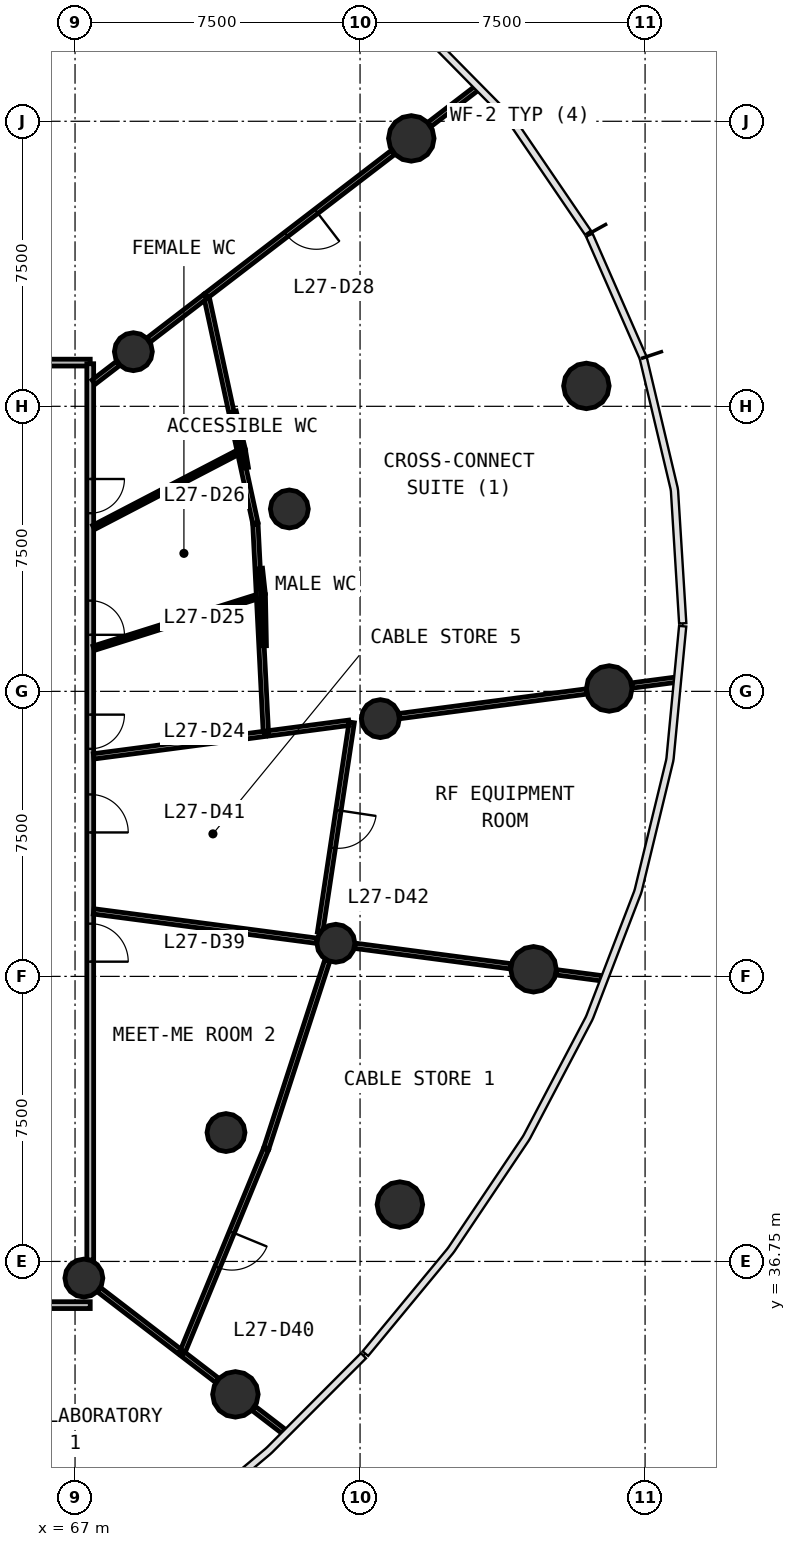
"""IFC4 building model, lengths in metres.
Left out: names, types, materials, properties, quantities, classifications, styles, units other than length and angle.
Written with IfcOpenShell. Run it as: python <this file> out.ifc"""

import sys

from ifc_helpers import new_model, si_unit, direction, frame, frame_2d, origin, origin_2d, place, context, subcontext, project, spatial, rectangle, circle, extrude, source, transform, mapped, element, fill, save


model = new_model("IFC4")
c1 = context("Model", 3, precision=1e-05, world=origin(), true_north=direction((0.0, 1.0)))
c2 = subcontext(c1, "Body", "Model", "MODEL_VIEW")
j1 = project(units=[si_unit("LENGTHUNIT", "METRE"), si_unit("PLANEANGLEUNIT", "RADIAN")], contexts=[c1])
p1 = place(None, origin())
s1 = spatial("IfcSite", under=j1, at=p1, CompositionType="ELEMENT")
p2 = place(p1, origin())
s2 = spatial("IfcBuilding", under=s1, at=p2, CompositionType="ELEMENT")
p3 = place(p2, frame((0.0, 0.0, 116.7)))
s3 = spatial("IfcBuildingStorey", under=s2, at=p3, CompositionType="ELEMENT", Elevation=116.7)
m1 = source(origin(), c2, "Body", "SweptSolid", [
    extrude(circle(Radius=0.6, at=origin_2d()), origin(), (0.0, 0.0, 1.0), 4.1),
])
for number, where, z_axis, x_axis in (
    (1, (81.056, 51.825, 0.0), (0.0, 0.0, 1.0), (1.0, 0.0, 0.0)),
    (2, (80.456, 59.787, 0.0), (0.0, 0.0, 1.0), (1.0, 0.0, 0.0)),
    (3, (75.848, 66.299, 0.0), (0.0, 0.0, 1.0), (1.0, 0.0, 0.0)),
    (4, (71.22, 33.252, 0.0), (0.0, 0.0, 1.0), (1.0, 0.0, 0.0)),
    (5, (75.548, 38.246, 0.0), (0.0, 0.0, 1.0), (1.0, 0.0, 0.0)),
    (6, (79.064, 44.437, 0.0), (0.0, 0.0, 1.0), (1.0, 0.0, 0.0)),
):
    element("IfcColumn", number, at=place(p3, frame(where, z_axis=z_axis, x_axis=x_axis)), inside=s3, PredefinedType="COLUMN", context=c2, shape_type="MappedRepresentation", body=[
        mapped(m1, transform((0.0, 0.0, 0.0), scale=1.0)),
    ])
m2 = source(origin(), c2, "Body", "SweptSolid", [
    extrude(circle(Radius=0.5, at=origin_2d()), origin(), (0.0, 0.0, 1.0), 4.1),
])
for number, where, z_axis, x_axis in (
    (7, (75.034, 51.032, 0.0), (0.0, 0.0, 1.0), (1.0, 0.0, 0.0)),
    (8, (72.639, 56.549, 0.0), (0.0, 0.0, 1.0), (1.0, 0.0, 0.0)),
    (9, (68.535, 60.688, 0.0), (0.0, 0.0, 1.0), (1.0, 0.0, 0.0)),
    (10, (67.232, 36.312, 0.0), (0.0, 0.0, 1.0), (1.0, 0.0, 0.0)),
    (11, (70.972, 40.141, 0.0), (0.0, 0.0, 1.0), (1.0, 0.0, 0.0)),
    (12, (73.863, 45.122, 0.0), (0.0, 0.0, 1.0), (1.0, 0.0, 0.0)),
):
    element("IfcColumn", number, at=place(p3, frame(where, z_axis=z_axis, x_axis=x_axis)), inside=s3, PredefinedType="COLUMN", context=c2, shape_type="MappedRepresentation", body=[
        mapped(m2, transform((0.0, 0.0, 0.0), scale=1.0)),
    ])
p4 = place(p3, frame((67.4, 35.6, 0.0), z_axis=(0.0, 0.0, 1.0), x_axis=(-1.0, 0.0, 0.0)))
e13 = element("IfcWall", 13, at=p4, inside=s3, PredefinedType="PARTITIONING", context=c2, shape_type="SweptSolid", body=[
    extrude(rectangle(XDim=30.8, YDim=0.18, at=frame_2d((15.4, 0.0))), origin(), (0.0, 0.0, 1.0), 2.9),
])
p5 = place(p4, frame((17.35, 0.0, 0.0)))
e14 = element("IfcOpeningElement", 14, at=p5, cuts=e13, PredefinedType="OPENING", context=c2, shape_type="SweptSolid", body=[
    extrude(rectangle(XDim=1.0, YDim=2.1, at=frame_2d((0.5, 1.05))), frame((0.0, 0.1, 0.0), z_axis=(0.0, -1.0, 0.0), x_axis=(1.0, 0.0, 0.0)), (0.0, 0.0, 1.0), 0.2),
])
p6 = place(p4, frame((14.95, 0.0, 0.0)))
e15 = element("IfcOpeningElement", 15, at=p6, cuts=e13, PredefinedType="OPENING", context=c2, shape_type="SweptSolid", body=[
    extrude(rectangle(XDim=1.0, YDim=2.1, at=frame_2d((0.5, 1.05))), frame((0.0, 0.1, 0.0), z_axis=(0.0, -1.0, 0.0), x_axis=(1.0, 0.0, 0.0)), (0.0, 0.0, 1.0), 0.2),
])
p7 = place(p4, frame((4.35, 0.0, 0.0)))
e16 = element("IfcOpeningElement", 16, at=p7, cuts=e13, PredefinedType="OPENING", context=c2, shape_type="SweptSolid", body=[
    extrude(rectangle(XDim=1.0, YDim=2.1, at=frame_2d((0.5, 1.05))), frame((0.0, 0.1, 0.0), z_axis=(0.0, -1.0, 0.0), x_axis=(1.0, 0.0, 0.0)), (0.0, 0.0, 1.0), 0.2),
])
p8 = place(p3, frame((36.6, 60.4, 0.0), z_axis=(0.0, 0.0, 1.0), x_axis=(1.0, 0.0, 0.0)))
e17 = element("IfcWall", 17, at=p8, inside=s3, PredefinedType="PARTITIONING", context=c2, shape_type="SweptSolid", body=[
    extrude(rectangle(XDim=30.8, YDim=0.18, at=frame_2d((15.4, 0.0))), origin(), (0.0, 0.0, 1.0), 2.9),
])
p9 = place(p8, frame((17.35, 0.0, 0.0)))
e18 = element("IfcOpeningElement", 18, at=p9, cuts=e17, PredefinedType="OPENING", context=c2, shape_type="SweptSolid", body=[
    extrude(rectangle(XDim=1.0, YDim=2.1, at=frame_2d((0.5, 1.05))), frame((0.0, 0.1, 0.0), z_axis=(0.0, -1.0, 0.0), x_axis=(1.0, 0.0, 0.0)), (0.0, 0.0, 1.0), 0.2),
])
p10 = place(p8, frame((14.95, 0.0, 0.0)))
e19 = element("IfcOpeningElement", 19, at=p10, cuts=e17, PredefinedType="OPENING", context=c2, shape_type="SweptSolid", body=[
    extrude(rectangle(XDim=1.0, YDim=2.1, at=frame_2d((0.5, 1.05))), frame((0.0, 0.1, 0.0), z_axis=(0.0, -1.0, 0.0), x_axis=(1.0, 0.0, 0.0)), (0.0, 0.0, 1.0), 0.2),
])
p11 = place(p8, frame((8.95, 0.0, 0.0)))
e20 = element("IfcOpeningElement", 20, at=p11, cuts=e17, PredefinedType="OPENING", context=c2, shape_type="SweptSolid", body=[
    extrude(rectangle(XDim=1.0, YDim=2.1, at=frame_2d((0.5, 1.05))), frame((0.0, 0.1, 0.0), z_axis=(0.0, -1.0, 0.0), x_axis=(1.0, 0.0, 0.0)), (0.0, 0.0, 1.0), 0.2),
])
p12 = place(p3, frame((67.4, 60.37, 0.0), z_axis=(0.0, 0.0, 1.0), x_axis=(0.0, -1.0, 0.0)))
e21 = element("IfcWall", 21, at=p12, inside=s3, PredefinedType="PARTITIONING", context=c2, shape_type="SweptSolid", body=[
    extrude(rectangle(XDim=23.583, YDim=0.18, at=frame_2d((11.791, 0.0))), origin(), (0.0, 0.0, 1.0), 2.9),
])
p13 = place(p12, frame((9.232, 0.0, 0.0)))
e22 = element("IfcOpeningElement", 22, at=p13, cuts=e21, PredefinedType="OPENING", context=c2, shape_type="SweptSolid", body=[
    extrude(rectangle(XDim=0.9, YDim=2.1, at=frame_2d((0.45, 1.05))), frame((0.0, 0.1, 0.0), z_axis=(0.0, -1.0, 0.0), x_axis=(1.0, 0.0, 0.0)), (0.0, 0.0, 1.0), 0.2),
])
p14 = place(p12, frame((6.232, 0.0, 0.0)))
e23 = element("IfcOpeningElement", 23, at=p14, cuts=e21, PredefinedType="OPENING", context=c2, shape_type="SweptSolid", body=[
    extrude(rectangle(XDim=0.9, YDim=2.1, at=frame_2d((0.45, 1.05))), frame((0.0, 0.1, 0.0), z_axis=(0.0, -1.0, 0.0), x_axis=(1.0, 0.0, 0.0)), (0.0, 0.0, 1.0), 0.2),
])
p15 = place(p12, frame((3.032, 0.0, 0.0)))
e24 = element("IfcOpeningElement", 24, at=p15, cuts=e21, PredefinedType="OPENING", context=c2, shape_type="SweptSolid", body=[
    extrude(rectangle(XDim=0.9, YDim=2.1, at=frame_2d((0.45, 1.05))), frame((0.0, 0.1, 0.0), z_axis=(0.0, -1.0, 0.0), x_axis=(1.0, 0.0, 0.0)), (0.0, 0.0, 1.0), 0.2),
])
p16 = place(p12, frame((14.732, 0.0, 0.0)))
e25 = element("IfcOpeningElement", 25, at=p16, cuts=e21, PredefinedType="OPENING", context=c2, shape_type="SweptSolid", body=[
    extrude(rectangle(XDim=1.0, YDim=2.1, at=frame_2d((0.5, 1.05))), frame((0.0, 0.1, 0.0), z_axis=(0.0, -1.0, 0.0), x_axis=(1.0, 0.0, 0.0)), (0.0, 0.0, 1.0), 0.2),
])
p17 = place(p12, frame((11.333, 0.0, 0.0)))
e26 = element("IfcOpeningElement", 26, at=p17, cuts=e21, PredefinedType="OPENING", context=c2, shape_type="SweptSolid", body=[
    extrude(rectangle(XDim=1.0, YDim=2.1, at=frame_2d((0.5, 1.05))), frame((0.0, 0.1, 0.0), z_axis=(0.0, -1.0, 0.0), x_axis=(1.0, 0.0, 0.0)), (0.0, 0.0, 1.0), 0.2),
])
p18 = place(p3, frame((75.369, 65.931, 0.0), z_axis=(0.0, 0.0, 1.0), x_axis=(-0.793364649737, -0.608746689969, 0.0)))
e27 = element("IfcWall", 27, at=p18, inside=s3, PredefinedType="PARTITIONING", context=c2, shape_type="SweptSolid", body=[
    extrude(rectangle(XDim=6.196, YDim=0.14, at=frame_2d((3.098, 0.0))), origin(), (0.0, 0.0, 1.0), 2.9),
])
p19 = place(p18, frame((2.545, 0.0, 0.0)))
e28 = element("IfcOpeningElement", 28, at=p19, cuts=e27, PredefinedType="OPENING", context=c2, shape_type="SweptSolid", body=[
    extrude(rectangle(XDim=1.0, YDim=2.1, at=frame_2d((0.5, 1.05))), frame((0.0, 0.08, 0.0), z_axis=(0.0, -1.0, 0.0), x_axis=(1.0, 0.0, 0.0)), (0.0, 0.0, 1.0), 0.16),
])
p20 = place(p3, frame((71.745, 56.178, 0.0), z_axis=(0.0, 0.0, 1.0), x_axis=(-0.211012899324, 0.977483276746, 0.0)))
e29 = element("IfcWall", 29, at=p20, inside=s3, PredefinedType="PARTITIONING", context=c2, shape_type="SweptSolid", body=[
    extrude(rectangle(XDim=6.089, YDim=0.14, at=frame_2d((3.045, 0.0))), origin(), (0.0, 0.0, 1.0), 2.9),
])
p21 = place(p3, frame((67.49, 45.961, 0.0), z_axis=(0.0, 0.0, 1.0), x_axis=(0.991445034615, -0.130524876315, 0.0)))
e30 = element("IfcWall", 30, at=p21, inside=s3, PredefinedType="PARTITIONING", context=c2, shape_type="SweptSolid", body=[
    extrude(rectangle(XDim=5.924, YDim=0.14, at=frame_2d((2.962, 0.0))), origin(), (0.0, 0.0, 1.0), 2.9),
])
p22 = place(p3, frame((72.025, 39.705, 0.0), z_axis=(0.0, 0.0, 1.0), x_axis=(-0.380730787006, -0.924685929289, 0.0)))
e31 = element("IfcWall", 31, at=p22, inside=s3, PredefinedType="PARTITIONING", context=c2, shape_type="SweptSolid", body=[
    extrude(rectangle(XDim=5.811, YDim=0.14, at=frame_2d((2.906, 0.0))), origin(), (0.0, 0.0, 1.0), 2.9),
])
p23 = place(p22, frame((2.361, 0.0, 0.0)))
e32 = element("IfcOpeningElement", 32, at=p23, cuts=e31, PredefinedType="OPENING", context=c2, shape_type="SweptSolid", body=[
    extrude(rectangle(XDim=1.0, YDim=2.1, at=frame_2d((0.5, 1.05))), frame((0.0, 0.08, 0.0), z_axis=(0.0, -1.0, 0.0), x_axis=(1.0, 0.0, 0.0)), (0.0, 0.0, 1.0), 0.16),
])
p24 = place(p3, frame((74.281, 50.933, 0.0), z_axis=(0.0, 0.0, 1.0), x_axis=(-0.149214013395, -0.988804924243, 0.0)))
e33 = element("IfcWall", 33, at=p24, inside=s3, PredefinedType="PARTITIONING", context=c2, shape_type="SweptSolid", body=[
    extrude(rectangle(XDim=5.589, YDim=0.14, at=frame_2d((2.794, 0.0))), origin(), (0.0, 0.0, 1.0), 2.9),
])
p25 = place(p24, frame((2.339, 0.0, 0.0)))
e34 = element("IfcOpeningElement", 34, at=p25, cuts=e33, PredefinedType="OPENING", context=c2, shape_type="SweptSolid", body=[
    extrude(rectangle(XDim=1.0, YDim=2.1, at=frame_2d((0.5, 1.05))), frame((0.0, 0.08, 0.0), z_axis=(0.0, -1.0, 0.0), x_axis=(1.0, 0.0, 0.0)), (0.0, 0.0, 1.0), 0.16),
])
p26 = place(p3, frame((72.023, 50.636, 0.0), z_axis=(0.0, 0.0, 1.0), x_axis=(-0.050114100286, 0.998743499079, 0.0)))
e35 = element("IfcWall", 35, at=p26, inside=s3, PredefinedType="PARTITIONING", context=c2, shape_type="SweptSolid", body=[
    extrude(rectangle(XDim=5.52, YDim=0.14, at=frame_2d((2.76, 0.0))), origin(), (0.0, 0.0, 1.0), 2.9),
])
p27 = place(p3, frame((72.035, 39.734, 0.0), z_axis=(0.0, 0.0, 1.0), x_axis=(0.309177540115, 0.95100433684, 0.0)))
e36 = element("IfcWall", 36, at=p27, inside=s3, PredefinedType="PARTITIONING", context=c2, shape_type="SweptSolid", body=[
    extrude(rectangle(XDim=5.19, YDim=0.14, at=frame_2d((2.595, 0.0))), origin(), (0.0, 0.0, 1.0), 2.9),
])
p28 = place(p3, frame((75.534, 51.098, 0.0), z_axis=(0.0, 0.0, 1.0), x_axis=(0.991443414541, 0.130537181533, 0.0)))
e37 = element("IfcWall", 37, at=p28, inside=s3, PredefinedType="PARTITIONING", context=c2, shape_type="SweptSolid", body=[
    extrude(rectangle(XDim=4.966, YDim=0.14, at=frame_2d((2.483, 0.0))), origin(), (0.0, 0.0, 1.0), 2.9),
])
p29 = place(p3, frame((67.49, 50.039, 0.0), z_axis=(0.0, 0.0, 1.0), x_axis=(0.991447158899, 0.130508739594, 0.0)))
e38 = element("IfcWall", 38, at=p29, inside=s3, PredefinedType="PARTITIONING", context=c2, shape_type="SweptSolid", body=[
    extrude(rectangle(XDim=4.542, YDim=0.14, at=frame_2d((2.271, 0.0))), origin(), (0.0, 0.0, 1.0), 2.9),
])
p30 = place(p3, frame((74.363, 45.056, 0.0), z_axis=(0.0, 0.0, 1.0), x_axis=(0.991445054296, -0.130524726824, 0.0)))
e39 = element("IfcWall", 39, at=p30, inside=s3, PredefinedType="PARTITIONING", context=c2, shape_type="SweptSolid", body=[
    extrude(rectangle(XDim=4.137, YDim=0.14, at=frame_2d((2.069, 0.0))), origin(), (0.0, 0.0, 1.0), 2.9),
])
p31 = place(p3, frame((67.633, 36.005, 0.0), z_axis=(0.0, 0.0, 1.0), x_axis=(0.793349293227, -0.60876670321, 0.0)))
e40 = element("IfcWall", 40, at=p31, inside=s3, PredefinedType="PARTITIONING", context=c2, shape_type="SweptSolid", body=[
    extrude(rectangle(XDim=2.676, YDim=0.14, at=frame_2d((1.338, 0.0))), origin(), (0.0, 0.0, 1.0), 2.9),
])
p32 = place(p3, frame((72.092, 50.645, 0.0), z_axis=(0.0, 0.0, 1.0), x_axis=(0.991447286478, 0.130507770405, 0.0)))
e41 = element("IfcWall", 41, at=p32, inside=s3, PredefinedType="PARTITIONING", context=c2, shape_type="SweptSolid", body=[
    extrude(rectangle(XDim=2.135, YDim=0.14, at=frame_2d((1.067, 0.0))), origin(), (0.0, 0.0, 1.0), 2.9),
])
p33 = place(p3, frame((68.935, 60.995, 0.0), z_axis=(0.0, 0.0, 1.0), x_axis=(0.793326792115, 0.608796025703, 0.0)))
e42 = element("IfcWall", 42, at=p33, inside=s3, PredefinedType="PARTITIONING", context=c2, shape_type="SweptSolid", body=[
    extrude(rectangle(XDim=1.884, YDim=0.14, at=frame_2d((0.942, 0.0))), origin(), (0.0, 0.0, 1.0), 2.9),
])
p34 = place(p3, frame((76.328, 66.667, 0.0), z_axis=(0.0, 0.0, 1.0), x_axis=(0.793354548889, 0.60875985393, 0.0)))
e43 = element("IfcWall", 43, at=p34, inside=s3, PredefinedType="PARTITIONING", context=c2, shape_type="SweptSolid", body=[
    extrude(rectangle(XDim=1.576, YDim=0.14, at=frame_2d((0.788, 0.0))), origin(), (0.0, 0.0, 1.0), 2.9),
])
p35 = place(p3, frame((79.664, 44.358, 0.0), z_axis=(0.0, 0.0, 1.0), x_axis=(0.991444694364, -0.130527460778, 0.0)))
e44 = element("IfcWall", 44, at=p35, inside=s3, PredefinedType="PARTITIONING", context=c2, shape_type="SweptSolid", body=[
    extrude(rectangle(XDim=1.212, YDim=0.14, at=frame_2d((0.606, 0.0))), origin(), (0.0, 0.0, 1.0), 2.9),
])
p36 = place(p3, frame((69.837, 34.313, 0.0), z_axis=(0.0, 0.0, 1.0), x_axis=(0.79334062517, -0.60877799932, 0.0)))
e45 = element("IfcWall", 45, at=p36, inside=s3, PredefinedType="PARTITIONING", context=c2, shape_type="SweptSolid", body=[
    extrude(rectangle(XDim=1.139, YDim=0.14, at=frame_2d((0.569, 0.0))), origin(), (0.0, 0.0, 1.0), 2.9),
])
p37 = place(p3, frame((81.656, 51.904, 0.0), z_axis=(0.0, 0.0, 1.0), x_axis=(0.991450010741, 0.130487072933, 0.0)))
e46 = element("IfcWall", 46, at=p37, inside=s3, PredefinedType="PARTITIONING", context=c2, shape_type="SweptSolid", body=[
    extrude(rectangle(XDim=1.164, YDim=0.14, at=frame_2d((0.582, 0.0))), origin(), (0.0, 0.0, 1.0), 2.9),
])
p38 = place(p3, frame((71.699, 32.884, 0.0), z_axis=(0.0, 0.0, 1.0), x_axis=(0.793356384424, -0.608757461798, 0.0)))
e47 = element("IfcWall", 47, at=p38, inside=s3, PredefinedType="PARTITIONING", context=c2, shape_type="SweptSolid", body=[
    extrude(rectangle(XDim=0.99, YDim=0.14, at=frame_2d((0.495, 0.0))), origin(), (0.0, 0.0, 1.0), 2.9),
])
p39 = place(p3, frame((67.49, 59.886, 0.0), z_axis=(0.0, 0.0, 1.0), x_axis=(0.793316076519, 0.608809989025, 0.0)))
e48 = element("IfcWall", 48, at=p39, inside=s3, PredefinedType="PARTITIONING", context=c2, shape_type="SweptSolid", body=[
    extrude(rectangle(XDim=0.812, YDim=0.14, at=frame_2d((0.406, 0.0))), origin(), (0.0, 0.0, 1.0), 2.9),
])
p40 = place(p3, frame((67.49, 52.884, 0.0), z_axis=(0.0, 0.0, 1.0), x_axis=(0.953722264315, 0.300688946503, 0.0)))
e49 = element("IfcWall", 49, at=p40, inside=s3, PredefinedType="PARTITIONING", context=c2, shape_type="SweptSolid", body=[
    extrude(rectangle(XDim=4.49, YDim=0.12, at=frame_2d((2.245, 0.0))), origin(), (0.0, 0.0, 1.0), 2.9),
])
p41 = place(p3, frame((67.49, 56.064, 0.0), z_axis=(0.0, 0.0, 1.0), x_axis=(0.887026446317, 0.461718619436, 0.0)))
e50 = element("IfcWall", 50, at=p41, inside=s3, PredefinedType="PARTITIONING", context=c2, shape_type="SweptSolid", body=[
    extrude(rectangle(XDim=4.264, YDim=0.12, at=frame_2d((2.132, 0.0))), origin(), (0.0, 0.0, 1.0), 2.9),
])
p42 = place(p3, frame((71.423, 58.111, 0.0), z_axis=(0.0, 0.0, 1.0), x_axis=(-0.232763298867, 0.972533416753, 0.0)))
e51 = element("IfcWall", 51, at=p42, inside=s3, PredefinedType="PARTITIONING", context=c2, shape_type="SweptSolid", body=[
    extrude(rectangle(XDim=1.03, YDim=0.12, at=frame_2d((0.515, 0.0))), origin(), (0.0, 0.0, 1.0), 2.9),
])
p43 = place(p3, frame((71.977, 52.95, 0.0), z_axis=(0.0, 0.0, 1.0), x_axis=(-0.019846754813, 0.999803033764, 0.0)))
e52 = element("IfcWall", 52, at=p43, inside=s3, PredefinedType="PARTITIONING", context=c2, shape_type="SweptSolid", body=[
    extrude(rectangle(XDim=1.341, YDim=0.12, at=frame_2d((0.67, 0.0))), origin(), (0.0, 0.0, 1.0), 2.9),
])
p44 = place(p3, frame((71.502, 57.633, 0.0), z_axis=(0.0, 0.0, 1.0), x_axis=(-0.16431191093, 0.986408432611, 0.0)))
e53 = element("IfcWall", 53, at=p44, inside=s3, PredefinedType="PARTITIONING", context=c2, shape_type="SweptSolid", body=[
    extrude(rectangle(XDim=0.455, YDim=0.12, at=frame_2d((0.227, 0.0))), origin(), (0.0, 0.0, 1.0), 2.9),
])
p45 = place(p3, frame((71.947, 54.32, 0.0), z_axis=(0.0, 0.0, 1.0), x_axis=(-0.108019844457, 0.994148737968, 0.0)))
e54 = element("IfcWall", 54, at=p45, inside=s3, PredefinedType="PARTITIONING", context=c2, shape_type="SweptSolid", body=[
    extrude(rectangle(XDim=0.667, YDim=0.12, at=frame_2d((0.333, 0.0))), origin(), (0.0, 0.0, 1.0), 2.9),
])
m3 = source(origin(), c2, "Body", "SweptSolid", [
    extrude(rectangle(XDim=0.9, YDim=2.1, at=frame_2d((0.45, 1.05))), frame((0.0, 0.025, 0.0), z_axis=(0.0, -1.0, 0.0), x_axis=(1.0, 0.0, 0.0)), (0.0, 0.0, 1.0), 0.05),
])
p46 = place(p13, origin())
e55 = element("IfcDoor", 55, at=p46, inside=s3, OperationType="SINGLE_SWING_LEFT", PredefinedType="DOOR", context=c2, shape_type="MappedRepresentation", body=[
    mapped(m3, transform((0.0, 0.0, 0.0), scale=1.0)),
])
fill(e22, e55)
p47 = place(p14, origin())
e56 = element("IfcDoor", 56, at=p47, inside=s3, OperationType="SINGLE_SWING_RIGHT", PredefinedType="DOOR", context=c2, shape_type="MappedRepresentation", body=[
    mapped(m3, transform((0.0, 0.0, 0.0), scale=1.0)),
])
fill(e23, e56)
p48 = place(p15, origin())
e57 = element("IfcDoor", 57, at=p48, inside=s3, OperationType="SINGLE_SWING_LEFT", PredefinedType="DOOR", context=c2, shape_type="MappedRepresentation", body=[
    mapped(m3, transform((0.0, 0.0, 0.0), scale=1.0)),
])
fill(e24, e57)
m4 = source(origin(), c2, "Body", "SweptSolid", [
    extrude(rectangle(XDim=1.0, YDim=2.1, at=frame_2d((0.5, 1.05))), frame((0.0, 0.025, 0.0), z_axis=(0.0, -1.0, 0.0), x_axis=(1.0, 0.0, 0.0)), (0.0, 0.0, 1.0), 0.05),
])
p49 = place(p19, origin())
e58 = element("IfcDoor", 58, at=p49, inside=s3, OperationType="SINGLE_SWING_LEFT", PredefinedType="DOOR", context=c2, shape_type="MappedRepresentation", body=[
    mapped(m4, transform((0.0, 0.0, 0.0), scale=1.0)),
])
fill(e28, e58)
p50 = place(p16, origin())
e59 = element("IfcDoor", 59, at=p50, inside=s3, OperationType="SINGLE_SWING_RIGHT", PredefinedType="DOOR", context=c2, shape_type="MappedRepresentation", body=[
    mapped(m4, transform((0.0, 0.0, 0.0), scale=1.0)),
])
fill(e25, e59)
p51 = place(p23, origin())
e60 = element("IfcDoor", 60, at=p51, inside=s3, OperationType="SINGLE_SWING_LEFT", PredefinedType="DOOR", context=c2, shape_type="MappedRepresentation", body=[
    mapped(m4, transform((0.0, 0.0, 0.0), scale=1.0)),
])
fill(e32, e60)
p52 = place(p17, origin())
e61 = element("IfcDoor", 61, at=p52, inside=s3, OperationType="SINGLE_SWING_RIGHT", PredefinedType="DOOR", context=c2, shape_type="MappedRepresentation", body=[
    mapped(m4, transform((0.0, 0.0, 0.0), scale=1.0)),
])
fill(e26, e61)
p53 = place(p25, origin())
e62 = element("IfcDoor", 62, at=p53, inside=s3, OperationType="SINGLE_SWING_LEFT", PredefinedType="DOOR", context=c2, shape_type="MappedRepresentation", body=[
    mapped(m4, transform((0.0, 0.0, 0.0), scale=1.0)),
])
fill(e34, e62)
save(model, sys.argv[1])
